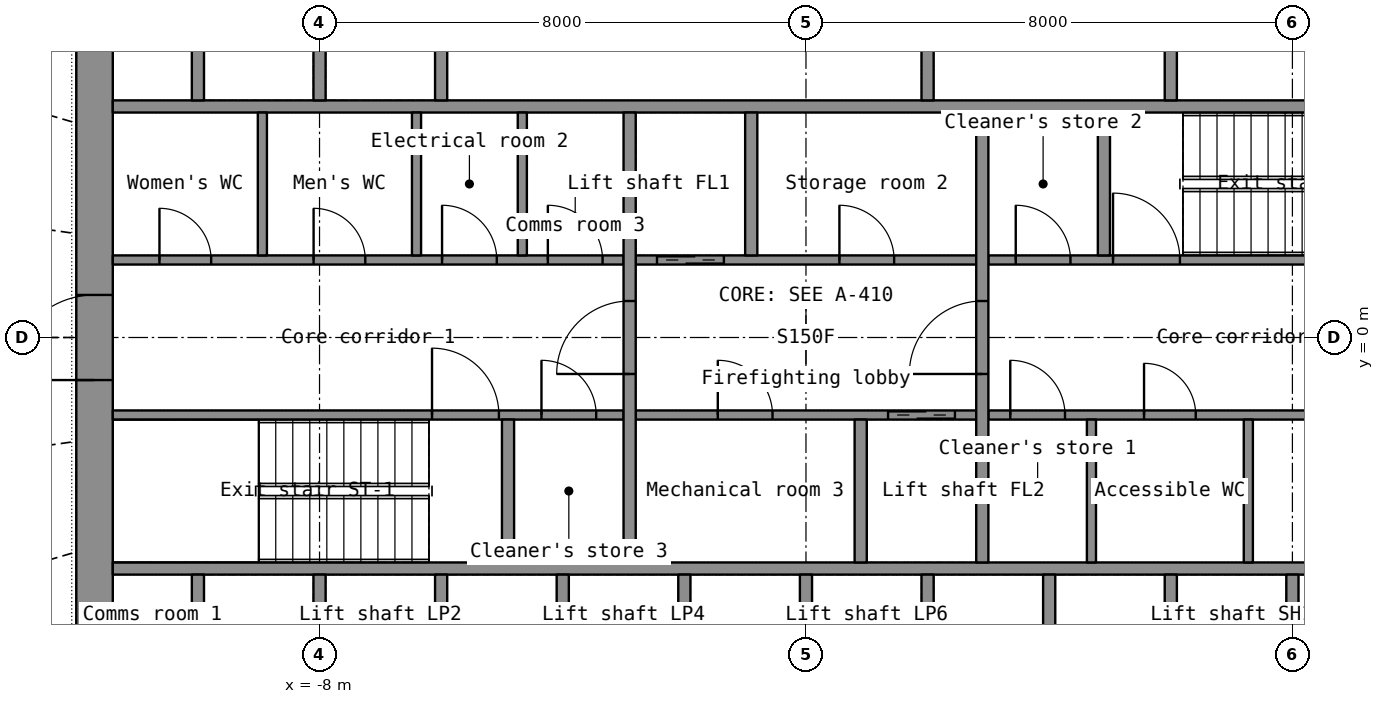
"""IFC4 building model, lengths in metres.
Left out: names, types, materials, properties, quantities, classifications, styles, units other than length and angle.
Written with IfcOpenShell. Run it as: python <this file> out.ifc"""

import sys

from ifc_helpers import new_model, si_unit, direction, frame, frame_2d, origin, place, context, subcontext, project, spatial, rectangle, extrude, element, fill, save


model = new_model("IFC4")
c1 = context("Model", 3, precision=1e-05, world=origin(), true_north=direction((0.0, 1.0)))
c2 = subcontext(c1, "Body", "Model", "MODEL_VIEW")
j1 = project(units=[si_unit("LENGTHUNIT", "METRE"), si_unit("PLANEANGLEUNIT", "RADIAN")], contexts=[c1])
p1 = place(None, origin())
s1 = spatial("IfcSite", under=j1, at=p1, CompositionType="ELEMENT")
p2 = place(p1, origin())
s2 = spatial("IfcBuilding", under=s1, at=p2, CompositionType="ELEMENT")
p3 = place(p2, frame((0.0, 0.0, 59.3)))
s3 = spatial("IfcBuildingStorey", under=s2, at=p3, CompositionType="ELEMENT", Elevation=59.3)
p4 = place(p3, frame((-11.7, -7.2, 0.0), z_axis=(0.0, 0.0, 1.0), x_axis=(0.0, 1.0, 0.0)))
e1 = element("IfcWall", 1, at=p4, inside=s3, PredefinedType="SHEAR", context=c2, shape_type="SweptSolid", body=[
    extrude(rectangle(XDim=14.4, YDim=0.6, at=frame_2d((7.2, 0.0))), origin(), (0.0, 0.0, 1.0), 3.3),
])
p5 = place(p4, frame((6.5, 0.0, 0.0)))
e2 = element("IfcOpeningElement", 2, at=p5, cuts=e1, PredefinedType="OPENING", context=c2, shape_type="SweptSolid", body=[
    extrude(rectangle(XDim=1.4, YDim=2.2, at=frame_2d((0.7, 1.1))), frame((0.0, 0.31, 0.0), z_axis=(0.0, -1.0, 0.0), x_axis=(1.0, 0.0, 0.0)), (0.0, 0.0, 1.0), 0.62),
])
for number, where, z_axis, x_axis in (
    (3, (-11.4, -3.8, 0.0), (0.0, 0.0, 1.0), (1.0, 0.0, 0.0)),
    (4, (-11.4, 3.8, 0.0), (0.0, 0.0, 1.0), (1.0, 0.0, 0.0)),
):
    element("IfcWall", number, at=place(p3, frame(where, z_axis=z_axis, x_axis=x_axis)), inside=s3, PredefinedType="SHEAR", context=c2, shape_type="SweptSolid", body=[
        extrude(rectangle(XDim=22.8, YDim=0.2, at=frame_2d((11.4, 0.0))), origin(), (0.0, 0.0, 1.0), 3.3),
    ])
for number, where, z_axis, x_axis in (
    (5, (-10.0, -6.6, 0.0), (0.0, 0.0, 1.0), (0.0, 1.0, 0.0)),
    (6, (-8.0, -6.6, 0.0), (0.0, 0.0, 1.0), (0.0, 1.0, 0.0)),
    (7, (-6.0, -6.6, 0.0), (0.0, 0.0, 1.0), (0.0, 1.0, 0.0)),
    (8, (-4.0, -6.6, 0.0), (0.0, 0.0, 1.0), (0.0, 1.0, 0.0)),
    (9, (-2.0, -6.6, 0.0), (0.0, 0.0, 1.0), (0.0, 1.0, 0.0)),
    (10, (0.0, -6.6, 0.0), (0.0, 0.0, 1.0), (0.0, 1.0, 0.0)),
    (11, (2.0, -6.6, 0.0), (0.0, 0.0, 1.0), (0.0, 1.0, 0.0)),
    (12, (4.0, -6.6, 0.0), (0.0, 0.0, 1.0), (0.0, 1.0, 0.0)),
    (13, (6.0, -6.6, 0.0), (0.0, 0.0, 1.0), (0.0, 1.0, 0.0)),
    (14, (8.0, -6.6, 0.0), (0.0, 0.0, 1.0), (0.0, 1.0, 0.0)),
    (15, (-10.0, 3.9, 0.0), (0.0, 0.0, 1.0), (0.0, 1.0, 0.0)),
    (16, (-8.0, 3.9, 0.0), (0.0, 0.0, 1.0), (0.0, 1.0, 0.0)),
    (17, (-6.0, 3.9, 0.0), (0.0, 0.0, 1.0), (0.0, 1.0, 0.0)),
):
    element("IfcWall", number, at=place(p3, frame(where, z_axis=z_axis, x_axis=x_axis)), inside=s3, PredefinedType="SHEAR", context=c2, shape_type="SweptSolid", body=[
        extrude(rectangle(XDim=2.7, YDim=0.2, at=frame_2d((1.35, 0.0))), origin(), (0.0, 0.0, 1.0), 3.3),
    ])
for number, where, z_axis, x_axis in (
    (18, (2.0, 3.9, 0.0), (0.0, 0.0, 1.0), (0.0, 1.0, 0.0)),
    (19, (6.0, 3.9, 0.0), (0.0, 0.0, 1.0), (0.0, 1.0, 0.0)),
):
    element("IfcWall", number, at=place(p3, frame(where, z_axis=z_axis, x_axis=x_axis)), inside=s3, PredefinedType="PARTITIONING", context=c2, shape_type="SweptSolid", body=[
        extrude(rectangle(XDim=2.7, YDim=0.2, at=frame_2d((1.35, 0.0))), origin(), (0.0, 0.0, 1.0), 3.3),
    ])
p6 = place(p3, frame((-11.4, -1.275, 0.0), z_axis=(0.0, 0.0, 1.0), x_axis=(1.0, 0.0, 0.0)))
e20 = element("IfcWall", 20, at=p6, inside=s3, PredefinedType="SHEAR", context=c2, shape_type="SweptSolid", body=[
    extrude(rectangle(XDim=8.4, YDim=0.15, at=frame_2d((4.2, 0.0))), origin(), (0.0, 0.0, 1.0), 3.3),
])
p7 = place(p6, frame((5.25, 0.0, 0.0)))
e21 = element("IfcOpeningElement", 21, at=p7, cuts=e20, PredefinedType="OPENING", context=c2, shape_type="SweptSolid", body=[
    extrude(rectangle(XDim=1.1, YDim=2.15, at=frame_2d((0.55, 1.075))), frame((0.0, 0.085, 0.0), z_axis=(0.0, -1.0, 0.0), x_axis=(1.0, 0.0, 0.0)), (0.0, 0.0, 1.0), 0.17),
])
p8 = place(p6, frame((7.05, 0.0, 0.0)))
e22 = element("IfcOpeningElement", 22, at=p8, cuts=e20, PredefinedType="OPENING", context=c2, shape_type="SweptSolid", body=[
    extrude(rectangle(XDim=0.9, YDim=2.1, at=frame_2d((0.45, 1.05))), frame((0.0, 0.085, 0.0), z_axis=(0.0, -1.0, 0.0), x_axis=(1.0, 0.0, 0.0)), (0.0, 0.0, 1.0), 0.17),
])
p9 = place(p3, frame((-2.8, -1.275, 0.0), z_axis=(0.0, 0.0, 1.0), x_axis=(1.0, 0.0, 0.0)))
e23 = element("IfcWall", 23, at=p9, inside=s3, PredefinedType="SHEAR", context=c2, shape_type="SweptSolid", body=[
    extrude(rectangle(XDim=5.6, YDim=0.15, at=frame_2d((2.8, 0.0))), origin(), (0.0, 0.0, 1.0), 3.3),
])
p10 = place(p9, frame((4.15, 0.0, 0.0)))
e24 = element("IfcOpeningElement", 24, at=p10, cuts=e23, PredefinedType="OPENING", context=c2, shape_type="SweptSolid", body=[
    extrude(rectangle(XDim=1.1, YDim=2.2, at=frame_2d((0.55, 1.1))), frame((0.0, 0.085, 0.0), z_axis=(0.0, -1.0, 0.0), x_axis=(1.0, 0.0, 0.0)), (0.0, 0.0, 1.0), 0.17),
])
p11 = place(p9, frame((1.35, 0.0, 0.0)))
e25 = element("IfcOpeningElement", 25, at=p11, cuts=e23, PredefinedType="OPENING", context=c2, shape_type="SweptSolid", body=[
    extrude(rectangle(XDim=0.9, YDim=2.1, at=frame_2d((0.45, 1.05))), frame((0.0, 0.085, 0.0), z_axis=(0.0, -1.0, 0.0), x_axis=(1.0, 0.0, 0.0)), (0.0, 0.0, 1.0), 0.17),
])
p12 = place(p3, frame((3.0, -1.275, 0.0), z_axis=(0.0, 0.0, 1.0), x_axis=(1.0, 0.0, 0.0)))
e26 = element("IfcWall", 26, at=p12, inside=s3, PredefinedType="PARTITIONING", context=c2, shape_type="SweptSolid", body=[
    extrude(rectangle(XDim=8.4, YDim=0.15, at=frame_2d((4.2, 0.0))), origin(), (0.0, 0.0, 1.0), 3.3),
])
p13 = place(p12, frame((0.36, 0.0, 0.0)))
e27 = element("IfcOpeningElement", 27, at=p13, cuts=e26, PredefinedType="OPENING", context=c2, shape_type="SweptSolid", body=[
    extrude(rectangle(XDim=0.9, YDim=2.1, at=frame_2d((0.45, 1.05))), frame((0.0, 0.085, 0.0), z_axis=(0.0, -1.0, 0.0), x_axis=(1.0, 0.0, 0.0)), (0.0, 0.0, 1.0), 0.17),
])
p14 = place(p12, frame((2.56, 0.0, 0.0)))
e28 = element("IfcOpeningElement", 28, at=p14, cuts=e26, PredefinedType="OPENING", context=c2, shape_type="SweptSolid", body=[
    extrude(rectangle(XDim=0.85, YDim=2.1, at=frame_2d((0.425, 1.05))), frame((0.0, 0.085, 0.0), z_axis=(0.0, -1.0, 0.0), x_axis=(1.0, 0.0, 0.0)), (0.0, 0.0, 1.0), 0.17),
])
p15 = place(p12, frame((5.95, 0.0, 0.0)))
e29 = element("IfcOpeningElement", 29, at=p15, cuts=e26, PredefinedType="OPENING", context=c2, shape_type="SweptSolid", body=[
    extrude(rectangle(XDim=0.85, YDim=2.1, at=frame_2d((0.425, 1.05))), frame((0.0, 0.085, 0.0), z_axis=(0.0, -1.0, 0.0), x_axis=(1.0, 0.0, 0.0)), (0.0, 0.0, 1.0), 0.17),
])
p16 = place(p3, frame((-11.4, 1.275, 0.0), z_axis=(0.0, 0.0, 1.0), x_axis=(1.0, 0.0, 0.0)))
e30 = element("IfcWall", 30, at=p16, inside=s3, PredefinedType="PARTITIONING", context=c2, shape_type="SweptSolid", body=[
    extrude(rectangle(XDim=8.4, YDim=0.15, at=frame_2d((4.2, 0.0))), origin(), (0.0, 0.0, 1.0), 3.3),
])
p17 = place(p16, frame((0.768, 0.0, 0.0)))
e31 = element("IfcOpeningElement", 31, at=p17, cuts=e30, PredefinedType="OPENING", context=c2, shape_type="SweptSolid", body=[
    extrude(rectangle(XDim=0.85, YDim=2.1, at=frame_2d((0.425, 1.05))), frame((0.0, 0.085, 0.0), z_axis=(0.0, -1.0, 0.0), x_axis=(1.0, 0.0, 0.0)), (0.0, 0.0, 1.0), 0.17),
])
p18 = place(p16, frame((3.302, 0.0, 0.0)))
e32 = element("IfcOpeningElement", 32, at=p18, cuts=e30, PredefinedType="OPENING", context=c2, shape_type="SweptSolid", body=[
    extrude(rectangle(XDim=0.85, YDim=2.1, at=frame_2d((0.425, 1.05))), frame((0.0, 0.085, 0.0), z_axis=(0.0, -1.0, 0.0), x_axis=(1.0, 0.0, 0.0)), (0.0, 0.0, 1.0), 0.17),
])
p19 = place(p16, frame((5.415, 0.0, 0.0)))
e33 = element("IfcOpeningElement", 33, at=p19, cuts=e30, PredefinedType="OPENING", context=c2, shape_type="SweptSolid", body=[
    extrude(rectangle(XDim=0.9, YDim=2.1, at=frame_2d((0.45, 1.05))), frame((0.0, 0.085, 0.0), z_axis=(0.0, -1.0, 0.0), x_axis=(1.0, 0.0, 0.0)), (0.0, 0.0, 1.0), 0.17),
])
p20 = place(p16, frame((7.155, 0.0, 0.0)))
e34 = element("IfcOpeningElement", 34, at=p20, cuts=e30, PredefinedType="OPENING", context=c2, shape_type="SweptSolid", body=[
    extrude(rectangle(XDim=0.9, YDim=2.1, at=frame_2d((0.45, 1.05))), frame((0.0, 0.085, 0.0), z_axis=(0.0, -1.0, 0.0), x_axis=(1.0, 0.0, 0.0)), (0.0, 0.0, 1.0), 0.17),
])
p21 = place(p3, frame((-2.8, 1.275, 0.0), z_axis=(0.0, 0.0, 1.0), x_axis=(1.0, 0.0, 0.0)))
e35 = element("IfcWall", 35, at=p21, inside=s3, PredefinedType="SHEAR", context=c2, shape_type="SweptSolid", body=[
    extrude(rectangle(XDim=5.6, YDim=0.15, at=frame_2d((2.8, 0.0))), origin(), (0.0, 0.0, 1.0), 3.3),
])
p22 = place(p21, frame((0.35, 0.0, 0.0)))
e36 = element("IfcOpeningElement", 36, at=p22, cuts=e35, PredefinedType="OPENING", context=c2, shape_type="SweptSolid", body=[
    extrude(rectangle(XDim=1.1, YDim=2.2, at=frame_2d((0.55, 1.1))), frame((0.0, 0.085, 0.0), z_axis=(0.0, -1.0, 0.0), x_axis=(1.0, 0.0, 0.0)), (0.0, 0.0, 1.0), 0.17),
])
p23 = place(p21, frame((3.35, 0.0, 0.0)))
e37 = element("IfcOpeningElement", 37, at=p23, cuts=e35, PredefinedType="OPENING", context=c2, shape_type="SweptSolid", body=[
    extrude(rectangle(XDim=0.9, YDim=2.1, at=frame_2d((0.45, 1.05))), frame((0.0, 0.085, 0.0), z_axis=(0.0, -1.0, 0.0), x_axis=(1.0, 0.0, 0.0)), (0.0, 0.0, 1.0), 0.17),
])
p24 = place(p3, frame((3.0, 1.275, 0.0), z_axis=(0.0, 0.0, 1.0), x_axis=(1.0, 0.0, 0.0)))
e38 = element("IfcWall", 38, at=p24, inside=s3, PredefinedType="SHEAR", context=c2, shape_type="SweptSolid", body=[
    extrude(rectangle(XDim=8.4, YDim=0.15, at=frame_2d((4.2, 0.0))), origin(), (0.0, 0.0, 1.0), 3.3),
])
p25 = place(p24, frame((2.05, 0.0, 0.0)))
e39 = element("IfcOpeningElement", 39, at=p25, cuts=e38, PredefinedType="OPENING", context=c2, shape_type="SweptSolid", body=[
    extrude(rectangle(XDim=1.1, YDim=2.15, at=frame_2d((0.55, 1.075))), frame((0.0, 0.085, 0.0), z_axis=(0.0, -1.0, 0.0), x_axis=(1.0, 0.0, 0.0)), (0.0, 0.0, 1.0), 0.17),
])
p26 = place(p24, frame((0.45, 0.0, 0.0)))
e40 = element("IfcOpeningElement", 40, at=p26, cuts=e38, PredefinedType="OPENING", context=c2, shape_type="SweptSolid", body=[
    extrude(rectangle(XDim=0.9, YDim=2.1, at=frame_2d((0.45, 1.05))), frame((0.0, 0.085, 0.0), z_axis=(0.0, -1.0, 0.0), x_axis=(1.0, 0.0, 0.0)), (0.0, 0.0, 1.0), 0.17),
])
p27 = place(p3, frame((-2.9, -3.7, 0.0), z_axis=(0.0, 0.0, 1.0), x_axis=(0.0, 1.0, 0.0)))
e41 = element("IfcWall", 41, at=p27, inside=s3, PredefinedType="SHEAR", context=c2, shape_type="SweptSolid", body=[
    extrude(rectangle(XDim=7.4, YDim=0.2, at=frame_2d((3.7, 0.0))), origin(), (0.0, 0.0, 1.0), 3.3),
])
p28 = place(p27, frame((3.1, 0.0, 0.0)))
e42 = element("IfcOpeningElement", 42, at=p28, cuts=e41, PredefinedType="OPENING", context=c2, shape_type="SweptSolid", body=[
    extrude(rectangle(XDim=1.2, YDim=2.2, at=frame_2d((0.6, 1.1))), frame((0.0, 0.11, 0.0), z_axis=(0.0, -1.0, 0.0), x_axis=(1.0, 0.0, 0.0)), (0.0, 0.0, 1.0), 0.22),
])
p29 = place(p3, frame((2.9, -3.7, 0.0), z_axis=(0.0, 0.0, 1.0), x_axis=(0.0, 1.0, 0.0)))
e43 = element("IfcWall", 43, at=p29, inside=s3, PredefinedType="SHEAR", context=c2, shape_type="SweptSolid", body=[
    extrude(rectangle(XDim=7.4, YDim=0.2, at=frame_2d((3.7, 0.0))), origin(), (0.0, 0.0, 1.0), 3.3),
])
p30 = place(p29, frame((3.1, 0.0, 0.0)))
e44 = element("IfcOpeningElement", 44, at=p30, cuts=e43, PredefinedType="OPENING", context=c2, shape_type="SweptSolid", body=[
    extrude(rectangle(XDim=1.2, YDim=2.2, at=frame_2d((0.6, 1.1))), frame((0.0, 0.11, 0.0), z_axis=(0.0, -1.0, 0.0), x_axis=(1.0, 0.0, 0.0)), (0.0, 0.0, 1.0), 0.22),
])
for number, where, z_axis, x_axis in (
    (45, (-0.9, 1.35, 0.0), (0.0, 0.0, 1.0), (0.0, 1.0, 0.0)),
    (46, (0.9, -3.7, 0.0), (0.0, 0.0, 1.0), (0.0, 1.0, 0.0)),
    (47, (-4.9, -3.7, 0.0), (0.0, 0.0, 1.0), (0.0, 1.0, 0.0)),
    (48, (4.9, 1.35, 0.0), (0.0, 0.0, 1.0), (0.0, 1.0, 0.0)),
):
    element("IfcWall", number, at=place(p3, frame(where, z_axis=z_axis, x_axis=x_axis)), inside=s3, PredefinedType="SHEAR", context=c2, shape_type="SweptSolid", body=[
        extrude(rectangle(XDim=2.35, YDim=0.2, at=frame_2d((1.175, 0.0))), origin(), (0.0, 0.0, 1.0), 3.3),
    ])
for number, where, z_axis, x_axis in (
    (49, (-8.94, 1.35, 0.0), (0.0, 0.0, 1.0), (0.0, 1.0, 0.0)),
    (50, (-6.405, 1.35, 0.0), (0.0, 0.0, 1.0), (0.0, 1.0, 0.0)),
    (51, (-4.665, 1.35, 0.0), (0.0, 0.0, 1.0), (0.0, 1.0, 0.0)),
    (52, (4.695, -3.7, 0.0), (0.0, 0.0, 1.0), (0.0, 1.0, 0.0)),
    (53, (7.275, -3.7, 0.0), (0.0, 0.0, 1.0), (0.0, 1.0, 0.0)),
):
    element("IfcWall", number, at=place(p3, frame(where, z_axis=z_axis, x_axis=x_axis)), inside=s3, PredefinedType="PARTITIONING", context=c2, shape_type="SweptSolid", body=[
        extrude(rectangle(XDim=2.35, YDim=0.15, at=frame_2d((1.175, 0.0))), origin(), (0.0, 0.0, 1.0), 3.3),
    ])
p31 = place(p5, origin())
e54 = element("IfcDoor", 54, at=p31, inside=s3, OperationType="DOUBLE_DOOR_SINGLE_SWING", PredefinedType="DOOR", context=c2, shape_type="SweptSolid", body=[
    extrude(rectangle(XDim=1.4, YDim=2.2, at=frame_2d((0.7, 1.1))), frame((0.0, 0.025, 0.0), z_axis=(0.0, -1.0, 0.0), x_axis=(1.0, 0.0, 0.0)), (0.0, 0.0, 1.0), 0.05),
])
fill(e2, e54)
p32 = place(p28, origin())
e55 = element("IfcDoor", 55, at=p32, inside=s3, OperationType="SINGLE_SWING_LEFT", PredefinedType="DOOR", context=c2, shape_type="SweptSolid", body=[
    extrude(rectangle(XDim=1.2, YDim=2.2, at=frame_2d((0.6, 1.1))), frame((0.0, 0.025, 0.0), z_axis=(0.0, -1.0, 0.0), x_axis=(1.0, 0.0, 0.0)), (0.0, 0.0, 1.0), 0.05),
])
fill(e42, e55)
p33 = place(p30, origin())
e56 = element("IfcDoor", 56, at=p33, inside=s3, OperationType="SINGLE_SWING_LEFT", PredefinedType="DOOR", context=c2, shape_type="SweptSolid", body=[
    extrude(rectangle(XDim=1.2, YDim=2.2, at=frame_2d((0.6, 1.1))), frame((0.0, 0.025, 0.0), z_axis=(0.0, -1.0, 0.0), x_axis=(1.0, 0.0, 0.0)), (0.0, 0.0, 1.0), 0.05),
])
fill(e44, e56)
p34 = place(p22, origin())
e57 = element("IfcDoor", 57, at=p34, inside=s3, OperationType="DOUBLE_DOOR_SLIDING", PredefinedType="DOOR", context=c2, shape_type="SweptSolid", body=[
    extrude(rectangle(XDim=1.1, YDim=2.2, at=frame_2d((0.55, 1.1))), frame((0.0, 0.025, 0.0), z_axis=(0.0, -1.0, 0.0), x_axis=(1.0, 0.0, 0.0)), (0.0, 0.0, 1.0), 0.05),
])
fill(e36, e57)
p35 = place(p10, origin())
e58 = element("IfcDoor", 58, at=p35, inside=s3, OperationType="DOUBLE_DOOR_SLIDING", PredefinedType="DOOR", context=c2, shape_type="SweptSolid", body=[
    extrude(rectangle(XDim=1.1, YDim=2.2, at=frame_2d((0.55, 1.1))), frame((0.0, 0.025, 0.0), z_axis=(0.0, -1.0, 0.0), x_axis=(1.0, 0.0, 0.0)), (0.0, 0.0, 1.0), 0.05),
])
fill(e24, e58)
p36 = place(p7, origin())
e59 = element("IfcDoor", 59, at=p36, inside=s3, OperationType="SINGLE_SWING_LEFT", PredefinedType="DOOR", context=c2, shape_type="SweptSolid", body=[
    extrude(rectangle(XDim=1.1, YDim=2.15, at=frame_2d((0.55, 1.075))), frame((0.0, 0.025, 0.0), z_axis=(0.0, -1.0, 0.0), x_axis=(1.0, 0.0, 0.0)), (0.0, 0.0, 1.0), 0.05),
])
fill(e21, e59)
p37 = place(p25, origin())
e60 = element("IfcDoor", 60, at=p37, inside=s3, OperationType="SINGLE_SWING_LEFT", PredefinedType="DOOR", context=c2, shape_type="SweptSolid", body=[
    extrude(rectangle(XDim=1.1, YDim=2.15, at=frame_2d((0.55, 1.075))), frame((0.0, 0.025, 0.0), z_axis=(0.0, -1.0, 0.0), x_axis=(1.0, 0.0, 0.0)), (0.0, 0.0, 1.0), 0.05),
])
fill(e39, e60)
p38 = place(p17, origin())
e61 = element("IfcDoor", 61, at=p38, inside=s3, OperationType="SINGLE_SWING_LEFT", PredefinedType="DOOR", context=c2, shape_type="SweptSolid", body=[
    extrude(rectangle(XDim=0.85, YDim=2.1, at=frame_2d((0.425, 1.05))), frame((0.0, 0.025, 0.0), z_axis=(0.0, -1.0, 0.0), x_axis=(1.0, 0.0, 0.0)), (0.0, 0.0, 1.0), 0.05),
])
fill(e31, e61)
p39 = place(p18, origin())
e62 = element("IfcDoor", 62, at=p39, inside=s3, OperationType="SINGLE_SWING_LEFT", PredefinedType="DOOR", context=c2, shape_type="SweptSolid", body=[
    extrude(rectangle(XDim=0.85, YDim=2.1, at=frame_2d((0.425, 1.05))), frame((0.0, 0.025, 0.0), z_axis=(0.0, -1.0, 0.0), x_axis=(1.0, 0.0, 0.0)), (0.0, 0.0, 1.0), 0.05),
])
fill(e32, e62)
p40 = place(p19, origin())
e63 = element("IfcDoor", 63, at=p40, inside=s3, OperationType="SINGLE_SWING_LEFT", PredefinedType="DOOR", context=c2, shape_type="SweptSolid", body=[
    extrude(rectangle(XDim=0.9, YDim=2.1, at=frame_2d((0.45, 1.05))), frame((0.0, 0.025, 0.0), z_axis=(0.0, -1.0, 0.0), x_axis=(1.0, 0.0, 0.0)), (0.0, 0.0, 1.0), 0.05),
])
fill(e33, e63)
p41 = place(p20, origin())
e64 = element("IfcDoor", 64, at=p41, inside=s3, OperationType="SINGLE_SWING_LEFT", PredefinedType="DOOR", context=c2, shape_type="SweptSolid", body=[
    extrude(rectangle(XDim=0.9, YDim=2.1, at=frame_2d((0.45, 1.05))), frame((0.0, 0.025, 0.0), z_axis=(0.0, -1.0, 0.0), x_axis=(1.0, 0.0, 0.0)), (0.0, 0.0, 1.0), 0.05),
])
fill(e34, e64)
p42 = place(p13, origin())
e65 = element("IfcDoor", 65, at=p42, inside=s3, OperationType="SINGLE_SWING_LEFT", PredefinedType="DOOR", context=c2, shape_type="SweptSolid", body=[
    extrude(rectangle(XDim=0.9, YDim=2.1, at=frame_2d((0.45, 1.05))), frame((0.0, 0.025, 0.0), z_axis=(0.0, -1.0, 0.0), x_axis=(1.0, 0.0, 0.0)), (0.0, 0.0, 1.0), 0.05),
])
fill(e27, e65)
p43 = place(p14, origin())
e66 = element("IfcDoor", 66, at=p43, inside=s3, OperationType="SINGLE_SWING_LEFT", PredefinedType="DOOR", context=c2, shape_type="SweptSolid", body=[
    extrude(rectangle(XDim=0.85, YDim=2.1, at=frame_2d((0.425, 1.05))), frame((0.0, 0.025, 0.0), z_axis=(0.0, -1.0, 0.0), x_axis=(1.0, 0.0, 0.0)), (0.0, 0.0, 1.0), 0.05),
])
fill(e28, e66)
p44 = place(p23, origin())
e67 = element("IfcDoor", 67, at=p44, inside=s3, OperationType="SINGLE_SWING_LEFT", PredefinedType="DOOR", context=c2, shape_type="SweptSolid", body=[
    extrude(rectangle(XDim=0.9, YDim=2.1, at=frame_2d((0.45, 1.05))), frame((0.0, 0.025, 0.0), z_axis=(0.0, -1.0, 0.0), x_axis=(1.0, 0.0, 0.0)), (0.0, 0.0, 1.0), 0.05),
])
fill(e37, e67)
p45 = place(p11, origin())
e68 = element("IfcDoor", 68, at=p45, inside=s3, OperationType="SINGLE_SWING_LEFT", PredefinedType="DOOR", context=c2, shape_type="SweptSolid", body=[
    extrude(rectangle(XDim=0.9, YDim=2.1, at=frame_2d((0.45, 1.05))), frame((0.0, 0.025, 0.0), z_axis=(0.0, -1.0, 0.0), x_axis=(1.0, 0.0, 0.0)), (0.0, 0.0, 1.0), 0.05),
])
fill(e25, e68)
p46 = place(p26, origin())
e69 = element("IfcDoor", 69, at=p46, inside=s3, OperationType="SINGLE_SWING_LEFT", PredefinedType="DOOR", context=c2, shape_type="SweptSolid", body=[
    extrude(rectangle(XDim=0.9, YDim=2.1, at=frame_2d((0.45, 1.05))), frame((0.0, 0.025, 0.0), z_axis=(0.0, -1.0, 0.0), x_axis=(1.0, 0.0, 0.0)), (0.0, 0.0, 1.0), 0.05),
])
fill(e40, e69)
p47 = place(p8, origin())
e70 = element("IfcDoor", 70, at=p47, inside=s3, OperationType="SINGLE_SWING_LEFT", PredefinedType="DOOR", context=c2, shape_type="SweptSolid", body=[
    extrude(rectangle(XDim=0.9, YDim=2.1, at=frame_2d((0.45, 1.05))), frame((0.0, 0.025, 0.0), z_axis=(0.0, -1.0, 0.0), x_axis=(1.0, 0.0, 0.0)), (0.0, 0.0, 1.0), 0.05),
])
fill(e22, e70)
save(model, sys.argv[1])
